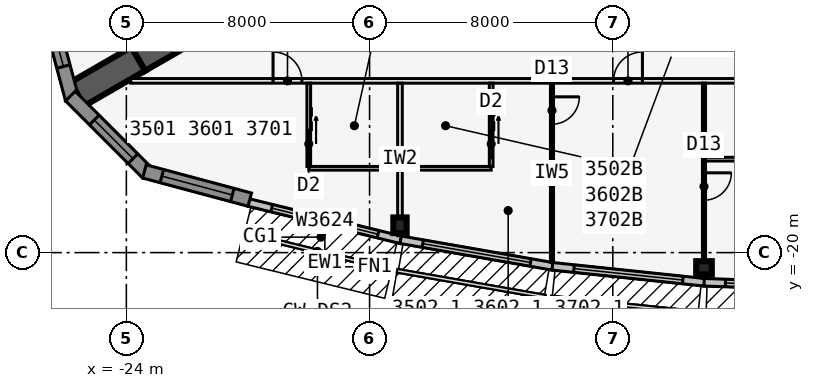
"""IFC4 building model, lengths in metres.
Left out: names, types, materials, properties, quantities, classifications, styles, units other than length and angle.
Written with IfcOpenShell. Run it as: python <this file> out.ifc"""

import sys

from ifc_helpers import new_model, si_unit, direction, frame, frame_2d, origin, origin_2d, place, context, subcontext, project, spatial, polyline, rectangle, i_section, outline, extrude, element, fill, save


model = new_model("IFC4")
c1 = context("Model", 3, precision=1e-05, world=origin(), true_north=direction((0.0, 1.0)))
c2 = subcontext(c1, "Body", "Model", "MODEL_VIEW")
j1 = project(units=[si_unit("LENGTHUNIT", "METRE"), si_unit("PLANEANGLEUNIT", "RADIAN")], contexts=[c1])
p1 = place(None, origin())
s1 = spatial("IfcSite", under=j1, at=p1, CompositionType="ELEMENT")
p2 = place(p1, origin())
s2 = spatial("IfcBuilding", under=s1, at=p2, CompositionType="ELEMENT")
p3 = place(p2, frame((0.0, 0.0, 135.1)))
s3 = spatial("IfcBuildingStorey", under=s2, at=p3, CompositionType="ELEMENT", Elevation=135.1)
for number, where, z_axis, x_axis in (
    (1, (-21.61, -12.477, 0.0), (0.0, 0.0, 1.0), (-0.866, -0.5, 0.0)),
    (2, (-23.61, -13.631, 0.0), (0.0, 0.0, 1.0), (-0.866, -0.5, 0.0)),
):
    element("IfcWall", number, at=place(p3, frame(where, z_axis=z_axis, x_axis=x_axis)), inside=s3, PredefinedType="SHEAR", context=c2, shape_type="SweptSolid", body=[
        extrude(rectangle(XDim=2.309, YDim=0.9, at=frame_2d((1.155, 0.0))), origin(), (0.0, 0.0, 1.0), 3.4),
    ])
for number, where, z_axis, x_axis in (
    (3, (-15.0, -19.1, 0.0), (0.0, 0.0, 1.0), (1.0, 0.0, 0.0)),
    (4, (-5.0, -20.5, 0.0), (0.0, 0.0, 1.0), (0.0, -1.0, 0.0)),
):
    element("IfcColumn", number, at=place(p3, frame(where, z_axis=z_axis, x_axis=x_axis)), inside=s3, PredefinedType="COLUMN", context=c2, shape_type="SweptSolid", body=[
        extrude(i_section(OverallWidth=0.437, OverallDepth=0.513, WebThickness=0.061, FlangeThickness=0.097, at=origin_2d()), origin(), (0.0, 0.0, 1.0), 3.4),
    ])
p4 = place(p3, frame((-19.97, -18.354, 0.0), z_axis=(0.0, 0.0, 1.0), x_axis=(0.971270024053, -0.237980126011, 0.0)))
e5 = element("IfcWall", 5, at=p4, inside=s3, PredefinedType="STANDARD", context=c2, shape_type="SweptSolid", body=[
    extrude(rectangle(XDim=5.148, YDim=0.25, at=frame_2d((2.574, 0.0))), origin(), (0.0, 0.0, 1.0), 3.235),
])
p5 = place(p4, frame((0.774, 0.0, 0.45)))
e6 = element("IfcOpeningElement", 6, at=p5, cuts=e5, PredefinedType="OPENING", context=c2, shape_type="SweptSolid", body=[
    extrude(rectangle(XDim=3.6, YDim=2.4, at=frame_2d((1.8, 1.2))), frame((0.0, 0.135, 0.0), z_axis=(0.0, -1.0, 0.0), x_axis=(1.0, 0.0, 0.0)), (0.0, 0.0, 1.0), 0.27),
])
p6 = place(p3, frame((-14.979, -19.577, 0.0), z_axis=(0.0, 0.0, 1.0), x_axis=(0.985030467156, -0.172380331752, 0.0)))
e7 = element("IfcWall", 7, at=p6, inside=s3, PredefinedType="STANDARD", context=c2, shape_type="SweptSolid", body=[
    extrude(rectangle(XDim=5.076, YDim=0.25, at=frame_2d((2.538, 0.0))), origin(), (0.0, 0.0, 1.0), 3.235),
])
p7 = place(p6, frame((0.738, 0.0, 0.45)))
e8 = element("IfcOpeningElement", 8, at=p7, cuts=e7, PredefinedType="OPENING", context=c2, shape_type="SweptSolid", body=[
    extrude(rectangle(XDim=3.6, YDim=2.4, at=frame_2d((1.8, 1.2))), frame((0.0, 0.135, 0.0), z_axis=(0.0, -1.0, 0.0), x_axis=(1.0, 0.0, 0.0)), (0.0, 0.0, 1.0), 0.27),
])
p8 = place(p3, frame((-9.987, -20.451, 0.0), z_axis=(0.0, 0.0, 1.0), x_axis=(0.994534683851, -0.104406717299, 0.0)))
e9 = element("IfcWall", 9, at=p8, inside=s3, PredefinedType="STANDARD", context=c2, shape_type="SweptSolid", body=[
    extrude(rectangle(XDim=5.028, YDim=0.25, at=frame_2d((2.514, 0.0))), origin(), (0.0, 0.0, 1.0), 3.235),
])
p9 = place(p8, frame((0.714, 0.0, 0.45)))
e10 = element("IfcOpeningElement", 10, at=p9, cuts=e9, PredefinedType="OPENING", context=c2, shape_type="SweptSolid", body=[
    extrude(rectangle(XDim=3.6, YDim=2.4, at=frame_2d((1.8, 1.2))), frame((0.0, 0.135, 0.0), z_axis=(0.0, -1.0, 0.0), x_axis=(1.0, 0.0, 0.0)), (0.0, 0.0, 1.0), 0.27),
])
p10 = place(p3, frame((-4.996, -20.975, 0.0), z_axis=(0.0, 0.0, 1.0), x_axis=(0.999387720943, -0.034988329879, 0.0)))
e11 = element("IfcWall", 11, at=p10, inside=s3, PredefinedType="STANDARD", context=c2, shape_type="SweptSolid", body=[
    extrude(rectangle(XDim=5.003, YDim=0.25, at=frame_2d((2.501, 0.0))), origin(), (0.0, 0.0, 1.0), 3.235),
])
p11 = place(p10, frame((0.701, 0.0, 0.45)))
e12 = element("IfcOpeningElement", 12, at=p11, cuts=e11, PredefinedType="OPENING", context=c2, shape_type="SweptSolid", body=[
    extrude(rectangle(XDim=3.6, YDim=2.4, at=frame_2d((1.8, 1.2))), frame((0.0, 0.135, 0.0), z_axis=(0.0, -1.0, 0.0), x_axis=(1.0, 0.0, 0.0)), (0.0, 0.0, 1.0), 0.27),
])
p12 = place(p3, frame((-26.711, -11.489, 0.0), z_axis=(0.0, 0.0, 1.0), x_axis=(0.258823421857, -0.965924653531, 0.0)))
e13 = element("IfcWall", 13, at=p12, inside=s3, PredefinedType="SOLIDWALL", context=c2, shape_type="SweptSolid", body=[
    extrude(outline(polyline([(3.586, 0.225), (3.527, 0.225), (3.035, 0.093), (3.0, 0.225), (0.0, 0.225), (0.0, -0.225), (3.586, -0.225), (3.586, 0.225)])), origin(), (0.0, 0.0, 1.0), 3.235),
])
p13 = place(p12, frame((0.675, 0.0, 0.45)))
e14 = element("IfcOpeningElement", 14, at=p13, cuts=e13, PredefinedType="OPENING", context=c2, shape_type="SweptSolid", body=[
    extrude(rectangle(XDim=1.8, YDim=2.4, at=frame_2d((0.9, 1.2))), frame((0.0, 0.235, 0.0), z_axis=(0.0, -1.0, 0.0), x_axis=(1.0, 0.0, 0.0)), (0.0, 0.0, 1.0), 0.47),
])
p14 = place(p3, frame((-25.841, -14.852, 0.0), z_axis=(0.0, 0.0, 1.0), x_axis=(0.707106781187, -0.707106781187, 0.0)))
e15 = element("IfcWall", 15, at=p14, inside=s3, PredefinedType="SOLIDWALL", context=c2, shape_type="SweptSolid", body=[
    extrude(outline(polyline([(3.586, 0.225), (0.586, 0.225), (0.551, 0.093), (0.059, 0.225), (0.0, 0.225), (0.0, -0.225), (3.586, -0.225), (3.586, 0.225)])), origin(), (0.0, 0.0, 1.0), 3.235),
])
p15 = place(p14, frame((1.111, 0.0, 0.45)))
e16 = element("IfcOpeningElement", 16, at=p15, cuts=e15, PredefinedType="OPENING", context=c2, shape_type="SweptSolid", body=[
    extrude(rectangle(XDim=1.8, YDim=2.4, at=frame_2d((0.9, 1.2))), frame((0.0, 0.235, 0.0), z_axis=(0.0, -1.0, 0.0), x_axis=(1.0, 0.0, 0.0)), (0.0, 0.0, 1.0), 0.47),
])
p16 = place(p3, frame((-23.406, -17.33, 0.0), z_axis=(0.0, 0.0, 1.0), x_axis=(0.965924653531, -0.258823421857, 0.0)))
e17 = element("IfcWall", 17, at=p16, inside=s3, PredefinedType="SOLIDWALL", context=c2, shape_type="SweptSolid", body=[
    extrude(rectangle(XDim=3.586, YDim=0.45, at=frame_2d((1.793, 0.0))), origin(), (0.0, 0.0, 1.0), 3.235),
])
p17 = place(p16, frame((0.593, 0.0, 0.45)))
e18 = element("IfcOpeningElement", 18, at=p17, cuts=e17, PredefinedType="OPENING", context=c2, shape_type="SweptSolid", body=[
    extrude(rectangle(XDim=2.4, YDim=2.4, at=frame_2d((1.2, 1.2))), frame((0.0, 0.235, 0.0), z_axis=(0.0, -1.0, 0.0), x_axis=(1.0, 0.0, 0.0)), (0.0, 0.0, 1.0), 0.47),
])
p18 = place(p3, frame((-23.857, -14.351, 0.0), z_axis=(0.0, 0.0, 1.0), x_axis=(1.0, 0.0, 0.0)))
e19 = element("IfcWall", 19, at=p18, inside=s3, PredefinedType="PARTITIONING", context=c2, shape_type="SweptSolid", body=[
    extrude(rectangle(XDim=47.714, YDim=0.15, at=frame_2d((23.857, 0.0))), origin(), (0.0, 0.0, 1.0), 3.235),
])
p19 = place(p18, frame((4.682, 0.0, 0.0)))
e20 = element("IfcOpeningElement", 20, at=p19, cuts=e19, PredefinedType="OPENING", context=c2, shape_type="SweptSolid", body=[
    extrude(rectangle(XDim=0.95, YDim=2.13, at=frame_2d((0.475, 1.065))), frame((0.0, 0.085, 0.0), z_axis=(0.0, -1.0, 0.0), x_axis=(1.0, 0.0, 0.0)), (0.0, 0.0, 1.0), 0.17),
])
p20 = place(p18, frame((15.882, 0.0, 0.0)))
e21 = element("IfcOpeningElement", 21, at=p20, cuts=e19, PredefinedType="OPENING", context=c2, shape_type="SweptSolid", body=[
    extrude(rectangle(XDim=0.95, YDim=2.13, at=frame_2d((0.475, 1.065))), frame((0.0, 0.085, 0.0), z_axis=(0.0, -1.0, 0.0), x_axis=(1.0, 0.0, 0.0)), (0.0, 0.0, 1.0), 0.17),
])
p21 = place(p18, frame((25.857, 0.0, 0.0)))
e22 = element("IfcOpeningElement", 22, at=p21, cuts=e19, PredefinedType="OPENING", context=c2, shape_type="SweptSolid", body=[
    extrude(rectangle(XDim=1.0, YDim=2.13, at=frame_2d((0.5, 1.065))), frame((0.0, 0.085, 0.0), z_axis=(0.0, -1.0, 0.0), x_axis=(1.0, 0.0, 0.0)), (0.0, 0.0, 1.0), 0.17),
])
p22 = place(p18, frame((30.282, 0.0, 0.0)))
e23 = element("IfcOpeningElement", 23, at=p22, cuts=e19, PredefinedType="OPENING", context=c2, shape_type="SweptSolid", body=[
    extrude(rectangle(XDim=0.95, YDim=2.13, at=frame_2d((0.475, 1.065))), frame((0.0, 0.085, 0.0), z_axis=(0.0, -1.0, 0.0), x_axis=(1.0, 0.0, 0.0)), (0.0, 0.0, 1.0), 0.17),
])
p23 = place(p18, frame((43.041, 0.0, 0.0)))
e24 = element("IfcOpeningElement", 24, at=p23, cuts=e19, PredefinedType="OPENING", context=c2, shape_type="SweptSolid", body=[
    extrude(rectangle(XDim=0.95, YDim=2.13, at=frame_2d((0.475, 1.065))), frame((0.0, 0.085, 0.0), z_axis=(0.0, -1.0, 0.0), x_axis=(1.0, 0.0, 0.0)), (0.0, 0.0, 1.0), 0.17),
])
p24 = place(p3, frame((-15.0, -14.426, 0.0), z_axis=(0.0, 0.0, 1.0), x_axis=(0.0, -1.0, 0.0)))
e25 = element("IfcWall", 25, at=p24, inside=s3, PredefinedType="PARTITIONING", context=c2, shape_type="SweptSolid", body=[
    extrude(rectangle(XDim=5.017, YDim=0.15, at=frame_2d((2.508, 0.0))), origin(), (0.0, 0.0, 1.0), 2.389),
])
p25 = place(p3, frame((-10.0, -14.426, 0.0), z_axis=(0.0, 0.0, 1.0), x_axis=(0.0, -1.0, 0.0)))
e26 = element("IfcWall", 26, at=p25, inside=s3, PredefinedType="PARTITIONING", context=c2, shape_type="SweptSolid", body=[
    extrude(rectangle(XDim=5.895, YDim=0.1, at=frame_2d((2.948, 0.0))), origin(), (0.0, 0.0, 1.0), 2.389),
])
p26 = place(p25, frame((0.45, 0.0, 0.0)))
e27 = element("IfcOpeningElement", 27, at=p26, cuts=e26, PredefinedType="OPENING", context=c2, shape_type="SweptSolid", body=[
    extrude(rectangle(XDim=0.9, YDim=2.13, at=frame_2d((0.45, 1.065))), frame((0.0, 0.06, 0.0), z_axis=(0.0, -1.0, 0.0), x_axis=(1.0, 0.0, 0.0)), (0.0, 0.0, 1.0), 0.12),
])
p27 = place(p3, frame((-5.0, -14.426, 0.0), z_axis=(0.0, 0.0, 1.0), x_axis=(0.0, -1.0, 0.0)))
e28 = element("IfcWall", 28, at=p27, inside=s3, PredefinedType="PARTITIONING", context=c2, shape_type="SweptSolid", body=[
    extrude(rectangle(XDim=6.423, YDim=0.1, at=frame_2d((3.211, 0.0))), origin(), (0.0, 0.0, 1.0), 2.389),
])
p28 = place(p27, frame((2.95, 0.0, 0.0)))
e29 = element("IfcOpeningElement", 29, at=p28, cuts=e28, PredefinedType="OPENING", context=c2, shape_type="SweptSolid", body=[
    extrude(rectangle(XDim=0.9, YDim=2.13, at=frame_2d((0.45, 1.065))), frame((0.0, 0.06, 0.0), z_axis=(0.0, -1.0, 0.0), x_axis=(1.0, 0.0, 0.0)), (0.0, 0.0, 1.0), 0.12),
])
p29 = place(p3, frame((-18.0, -17.226, 0.0), z_axis=(0.0, 0.0, 1.0), x_axis=(1.0, 0.0, 0.0)))
e30 = element("IfcWall", 30, at=p29, inside=s3, PredefinedType="PLUMBINGWALL", context=c2, shape_type="SweptSolid", body=[
    extrude(rectangle(XDim=3.0, YDim=0.12, at=frame_2d((1.5, 0.0))), origin(), (0.0, 0.0, 1.0), 3.235),
])
p30 = place(p3, frame((-18.0, -14.426, 0.0), z_axis=(0.0, 0.0, 1.0), x_axis=(0.0, -1.0, 0.0)))
e31 = element("IfcWall", 31, at=p30, inside=s3, PredefinedType="PLUMBINGWALL", context=c2, shape_type="SweptSolid", body=[
    extrude(rectangle(XDim=2.74, YDim=0.12, at=frame_2d((1.37, 0.0))), origin(), (0.0, 0.0, 1.0), 3.235),
])
p31 = place(p30, frame((1.55, 0.0, 0.0)))
e32 = element("IfcOpeningElement", 32, at=p31, cuts=e31, PredefinedType="OPENING", context=c2, shape_type="SweptSolid", body=[
    extrude(rectangle(XDim=0.9, YDim=2.13, at=frame_2d((0.45, 1.065))), frame((0.0, 0.07, 0.0), z_axis=(0.0, -1.0, 0.0), x_axis=(1.0, 0.0, 0.0)), (0.0, 0.0, 1.0), 0.14),
])
p32 = place(p3, frame((-15.0, -17.226, 0.0), z_axis=(0.0, 0.0, 1.0), x_axis=(1.0, 0.0, 0.0)))
e33 = element("IfcWall", 33, at=p32, inside=s3, PredefinedType="PLUMBINGWALL", context=c2, shape_type="SweptSolid", body=[
    extrude(rectangle(XDim=3.0, YDim=0.12, at=frame_2d((1.5, 0.0))), origin(), (0.0, 0.0, 1.0), 3.235),
])
p33 = place(p3, frame((-12.0, -14.426, 0.0), z_axis=(0.0, 0.0, 1.0), x_axis=(0.0, -1.0, 0.0)))
e34 = element("IfcWall", 34, at=p33, inside=s3, PredefinedType="PLUMBINGWALL", context=c2, shape_type="SweptSolid", body=[
    extrude(rectangle(XDim=2.74, YDim=0.12, at=frame_2d((1.37, 0.0))), origin(), (0.0, 0.0, 1.0), 3.235),
])
p34 = place(p33, frame((1.55, 0.0, 0.0)))
e35 = element("IfcOpeningElement", 35, at=p34, cuts=e34, PredefinedType="OPENING", context=c2, shape_type="SweptSolid", body=[
    extrude(rectangle(XDim=0.9, YDim=2.13, at=frame_2d((0.45, 1.065))), frame((0.0, 0.07, 0.0), z_axis=(0.0, -1.0, 0.0), x_axis=(1.0, 0.0, 0.0)), (0.0, 0.0, 1.0), 0.14),
])
p35 = place(p3, frame((-5.0, -16.926, 0.0), z_axis=(0.0, 0.0, 1.0), x_axis=(1.0, 0.0, 0.0)))
e36 = element("IfcWall", 36, at=p35, inside=s3, PredefinedType="PLUMBINGWALL", context=c2, shape_type="SweptSolid", body=[
    extrude(rectangle(XDim=2.4, YDim=0.12, at=frame_2d((1.2, 0.0))), origin(), (0.0, 0.0, 1.0), 3.235),
])
p36 = place(p5, origin())
e37 = element("IfcWindow", 37, at=p36, inside=s3, PartitioningType="SINGLE_PANEL", PredefinedType="WINDOW", context=c2, shape_type="SweptSolid", body=[
    extrude(rectangle(XDim=3.6, YDim=2.4, at=frame_2d((1.8, 1.2))), frame((0.0, 0.03, 0.0), z_axis=(0.0, -1.0, 0.0), x_axis=(1.0, 0.0, 0.0)), (0.0, 0.0, 1.0), 0.06),
])
fill(e6, e37)
p37 = place(p7, origin())
e38 = element("IfcWindow", 38, at=p37, inside=s3, PartitioningType="SINGLE_PANEL", PredefinedType="WINDOW", context=c2, shape_type="SweptSolid", body=[
    extrude(rectangle(XDim=3.6, YDim=2.4, at=frame_2d((1.8, 1.2))), frame((0.0, 0.03, 0.0), z_axis=(0.0, -1.0, 0.0), x_axis=(1.0, 0.0, 0.0)), (0.0, 0.0, 1.0), 0.06),
])
fill(e8, e38)
p38 = place(p9, origin())
e39 = element("IfcWindow", 39, at=p38, inside=s3, PartitioningType="SINGLE_PANEL", PredefinedType="WINDOW", context=c2, shape_type="SweptSolid", body=[
    extrude(rectangle(XDim=3.6, YDim=2.4, at=frame_2d((1.8, 1.2))), frame((0.0, 0.03, 0.0), z_axis=(0.0, -1.0, 0.0), x_axis=(1.0, 0.0, 0.0)), (0.0, 0.0, 1.0), 0.06),
])
fill(e10, e39)
p39 = place(p11, origin())
e40 = element("IfcWindow", 40, at=p39, inside=s3, PartitioningType="SINGLE_PANEL", PredefinedType="WINDOW", context=c2, shape_type="SweptSolid", body=[
    extrude(rectangle(XDim=3.6, YDim=2.4, at=frame_2d((1.8, 1.2))), frame((0.0, 0.03, 0.0), z_axis=(0.0, -1.0, 0.0), x_axis=(1.0, 0.0, 0.0)), (0.0, 0.0, 1.0), 0.06),
])
fill(e12, e40)
p40 = place(p13, origin())
e41 = element("IfcWindow", 41, at=p40, inside=s3, PartitioningType="SINGLE_PANEL", PredefinedType="WINDOW", context=c2, shape_type="SweptSolid", body=[
    extrude(rectangle(XDim=1.8, YDim=2.4, at=frame_2d((0.9, 1.2))), frame((0.0, 0.03, 0.0), z_axis=(0.0, -1.0, 0.0), x_axis=(1.0, 0.0, 0.0)), (0.0, 0.0, 1.0), 0.06),
])
fill(e14, e41)
p41 = place(p15, origin())
e42 = element("IfcWindow", 42, at=p41, inside=s3, PartitioningType="SINGLE_PANEL", PredefinedType="WINDOW", context=c2, shape_type="SweptSolid", body=[
    extrude(rectangle(XDim=1.8, YDim=2.4, at=frame_2d((0.9, 1.2))), frame((0.0, 0.03, 0.0), z_axis=(0.0, -1.0, 0.0), x_axis=(1.0, 0.0, 0.0)), (0.0, 0.0, 1.0), 0.06),
])
fill(e16, e42)
p42 = place(p17, origin())
e43 = element("IfcWindow", 43, at=p42, inside=s3, PartitioningType="SINGLE_PANEL", PredefinedType="WINDOW", context=c2, shape_type="SweptSolid", body=[
    extrude(rectangle(XDim=2.4, YDim=2.4, at=frame_2d((1.2, 1.2))), frame((0.0, 0.03, 0.0), z_axis=(0.0, -1.0, 0.0), x_axis=(1.0, 0.0, 0.0)), (0.0, 0.0, 1.0), 0.06),
])
fill(e18, e43)
p43 = place(p26, origin())
e44 = element("IfcDoor", 44, at=p43, inside=s3, OperationType="SINGLE_SWING_LEFT", PredefinedType="DOOR", context=c2, shape_type="SweptSolid", body=[
    extrude(rectangle(XDim=0.9, YDim=2.13, at=frame_2d((0.45, 1.065))), frame((0.0, 0.025, 0.0), z_axis=(0.0, -1.0, 0.0), x_axis=(1.0, 0.0, 0.0)), (0.0, 0.0, 1.0), 0.05),
])
fill(e27, e44)
p44 = place(p28, origin())
e45 = element("IfcDoor", 45, at=p44, inside=s3, OperationType="SINGLE_SWING_LEFT", PredefinedType="DOOR", context=c2, shape_type="SweptSolid", body=[
    extrude(rectangle(XDim=0.9, YDim=2.13, at=frame_2d((0.45, 1.065))), frame((0.0, 0.025, 0.0), z_axis=(0.0, -1.0, 0.0), x_axis=(1.0, 0.0, 0.0)), (0.0, 0.0, 1.0), 0.05),
])
fill(e29, e45)
p45 = place(p31, origin())
e46 = element("IfcDoor", 46, at=p45, inside=s3, OperationType="SLIDING_TO_LEFT", PredefinedType="DOOR", context=c2, shape_type="SweptSolid", body=[
    extrude(rectangle(XDim=0.9, YDim=2.13, at=frame_2d((0.45, 1.065))), frame((0.0, 0.025, 0.0), z_axis=(0.0, -1.0, 0.0), x_axis=(1.0, 0.0, 0.0)), (0.0, 0.0, 1.0), 0.05),
])
fill(e32, e46)
p46 = place(p19, origin())
e47 = element("IfcDoor", 47, at=p46, inside=s3, OperationType="SINGLE_SWING_LEFT", PredefinedType="DOOR", context=c2, shape_type="SweptSolid", body=[
    extrude(rectangle(XDim=0.95, YDim=2.13, at=frame_2d((0.475, 1.065))), frame((0.0, 0.025, 0.0), z_axis=(0.0, -1.0, 0.0), x_axis=(1.0, 0.0, 0.0)), (0.0, 0.0, 1.0), 0.05),
])
fill(e20, e47)
p47 = place(p34, origin())
e48 = element("IfcDoor", 48, at=p47, inside=s3, OperationType="SLIDING_TO_LEFT", PredefinedType="DOOR", context=c2, shape_type="SweptSolid", body=[
    extrude(rectangle(XDim=0.9, YDim=2.13, at=frame_2d((0.45, 1.065))), frame((0.0, 0.025, 0.0), z_axis=(0.0, -1.0, 0.0), x_axis=(1.0, 0.0, 0.0)), (0.0, 0.0, 1.0), 0.05),
])
fill(e35, e48)
p48 = place(p20, origin())
e49 = element("IfcDoor", 49, at=p48, inside=s3, OperationType="SINGLE_SWING_RIGHT", PredefinedType="DOOR", context=c2, shape_type="SweptSolid", body=[
    extrude(rectangle(XDim=0.95, YDim=2.13, at=frame_2d((0.475, 1.065))), frame((0.0, 0.025, 0.0), z_axis=(0.0, -1.0, 0.0), x_axis=(1.0, 0.0, 0.0)), (0.0, 0.0, 1.0), 0.05),
])
fill(e21, e49)
save(model, sys.argv[1])
